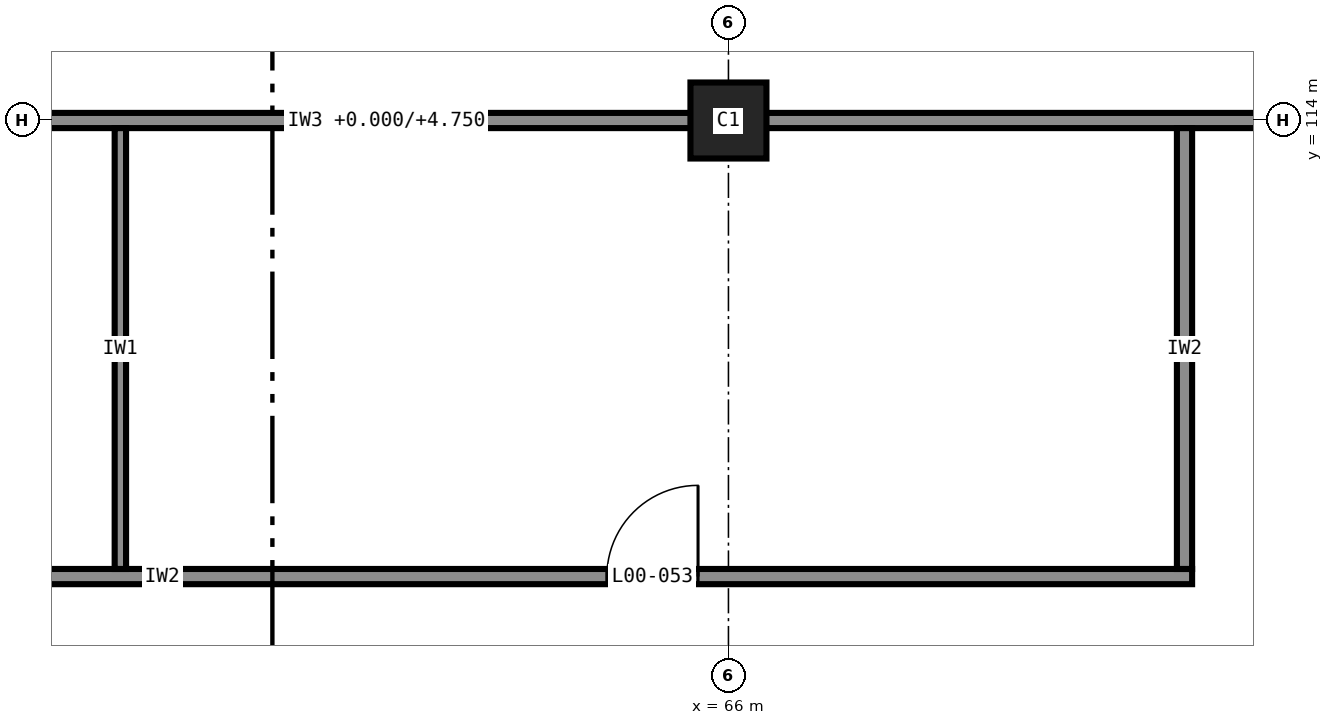
"""IFC4 building model, lengths in metres.
Left out: names, types, materials, properties, quantities, classifications, styles, units other than length and angle.
Written with IfcOpenShell. Run it as: python <this file> out.ifc"""

import sys

from ifc_helpers import new_model, si_unit, direction, frame, frame_2d, origin, origin_2d, place, context, subcontext, project, spatial, rectangle, extrude, element, fill, save


model = new_model("IFC4")
c1 = context("Model", 3, precision=1e-05, world=origin(), true_north=direction((0.0, 1.0)))
c2 = subcontext(c1, "Body", "Model", "MODEL_VIEW")
j1 = project(units=[si_unit("LENGTHUNIT", "METRE"), si_unit("PLANEANGLEUNIT", "RADIAN")], contexts=[c1])
p1 = place(None, origin())
s1 = spatial("IfcSite", under=j1, at=p1, CompositionType="ELEMENT")
p2 = place(p1, origin())
s2 = spatial("IfcBuilding", under=s1, at=p2, CompositionType="ELEMENT")
p3 = place(p2, origin())
s3 = spatial("IfcBuildingStorey", under=s2, at=p3, CompositionType="ELEMENT", Elevation=0.0)
p4 = place(p3, frame((66.0, 114.0, 0.0), z_axis=(0.0, 0.0, 1.0), x_axis=(1.0, 0.0, 0.0)))
e1 = element("IfcColumn", 1, at=p4, inside=s3, PredefinedType="COLUMN", context=c2, shape_type="SweptSolid", body=[
    extrude(rectangle(XDim=1.0, YDim=1.0, at=origin_2d()), origin(), (0.0, 0.0, 1.0), 6.0),
])
p5 = place(p3, frame((30.6, 108.0, 0.0), z_axis=(0.0, 0.0, 1.0), x_axis=(1.0, 0.0, 0.0)))
e2 = element("IfcWall", 2, at=p5, inside=s3, PredefinedType="PARTITIONING", context=c2, shape_type="SweptSolid", body=[
    extrude(rectangle(XDim=41.5, YDim=0.2, at=frame_2d((20.75, 0.0))), origin(), (0.0, 0.0, 1.0), 5.75),
])
p6 = place(p5, frame((5.8, 0.0, 0.0)))
e3 = element("IfcOpeningElement", 3, at=p6, cuts=e2, PredefinedType="OPENING", context=c2, shape_type="SweptSolid", body=[
    extrude(rectangle(XDim=1.2, YDim=2.1, at=frame_2d((0.6, 1.05))), frame((0.0, 0.11, 0.0), z_axis=(0.0, -1.0, 0.0), x_axis=(1.0, 0.0, 0.0)), (0.0, 0.0, 1.0), 0.22),
])
p7 = place(p5, frame((19.8, 0.0, 0.0)))
e4 = element("IfcOpeningElement", 4, at=p7, cuts=e2, PredefinedType="OPENING", context=c2, shape_type="SweptSolid", body=[
    extrude(rectangle(XDim=1.2, YDim=2.1, at=frame_2d((0.6, 1.05))), frame((0.0, 0.11, 0.0), z_axis=(0.0, -1.0, 0.0), x_axis=(1.0, 0.0, 0.0)), (0.0, 0.0, 1.0), 0.22),
])
p8 = place(p5, frame((33.8, 0.0, 0.0)))
e5 = element("IfcOpeningElement", 5, at=p8, cuts=e2, PredefinedType="OPENING", context=c2, shape_type="SweptSolid", body=[
    extrude(rectangle(XDim=1.2, YDim=2.1, at=frame_2d((0.6, 1.05))), frame((0.0, 0.11, 0.0), z_axis=(0.0, -1.0, 0.0), x_axis=(1.0, 0.0, 0.0)), (0.0, 0.0, 1.0), 0.22),
])
p9 = place(p3, frame((29.9, 114.0, 0.0), z_axis=(0.0, 0.0, 1.0), x_axis=(1.0, 0.0, 0.0)))
e6 = element("IfcWall", 6, at=p9, inside=s3, PredefinedType="PARTITIONING", context=c2, shape_type="SweptSolid", body=[
    extrude(rectangle(XDim=48.1, YDim=0.2, at=frame_2d((24.05, 0.0))), origin(), (0.0, 0.0, 1.0), 4.75),
])
p10 = place(p3, frame((58.0, 108.1, 0.0), z_axis=(0.0, 0.0, 1.0), x_axis=(0.0, 1.0, 0.0)))
e7 = element("IfcWall", 7, at=p10, inside=s3, PredefinedType="PARTITIONING", context=c2, shape_type="SweptSolid", body=[
    extrude(rectangle(XDim=5.8, YDim=0.15, at=frame_2d((2.9, 0.0))), origin(), (0.0, 0.0, 1.0), 5.75),
])
p11 = place(p3, frame((72.0, 108.1, 0.0), z_axis=(0.0, 0.0, 1.0), x_axis=(0.0, 1.0, 0.0)))
e8 = element("IfcWall", 8, at=p11, inside=s3, PredefinedType="PARTITIONING", context=c2, shape_type="SweptSolid", body=[
    extrude(rectangle(XDim=5.8, YDim=0.2, at=frame_2d((2.9, 0.0))), origin(), (0.0, 0.0, 1.0), 5.75),
])
p12 = place(p8, origin())
e9 = element("IfcDoor", 9, at=p12, inside=s3, OperationType="SINGLE_SWING_LEFT", PredefinedType="DOOR", context=c2, shape_type="SweptSolid", body=[
    extrude(rectangle(XDim=1.2, YDim=2.1, at=frame_2d((0.6, 1.05))), frame((0.0, 0.025, 0.0), z_axis=(0.0, -1.0, 0.0), x_axis=(1.0, 0.0, 0.0)), (0.0, 0.0, 1.0), 0.05),
])
fill(e5, e9)
save(model, sys.argv[1])
